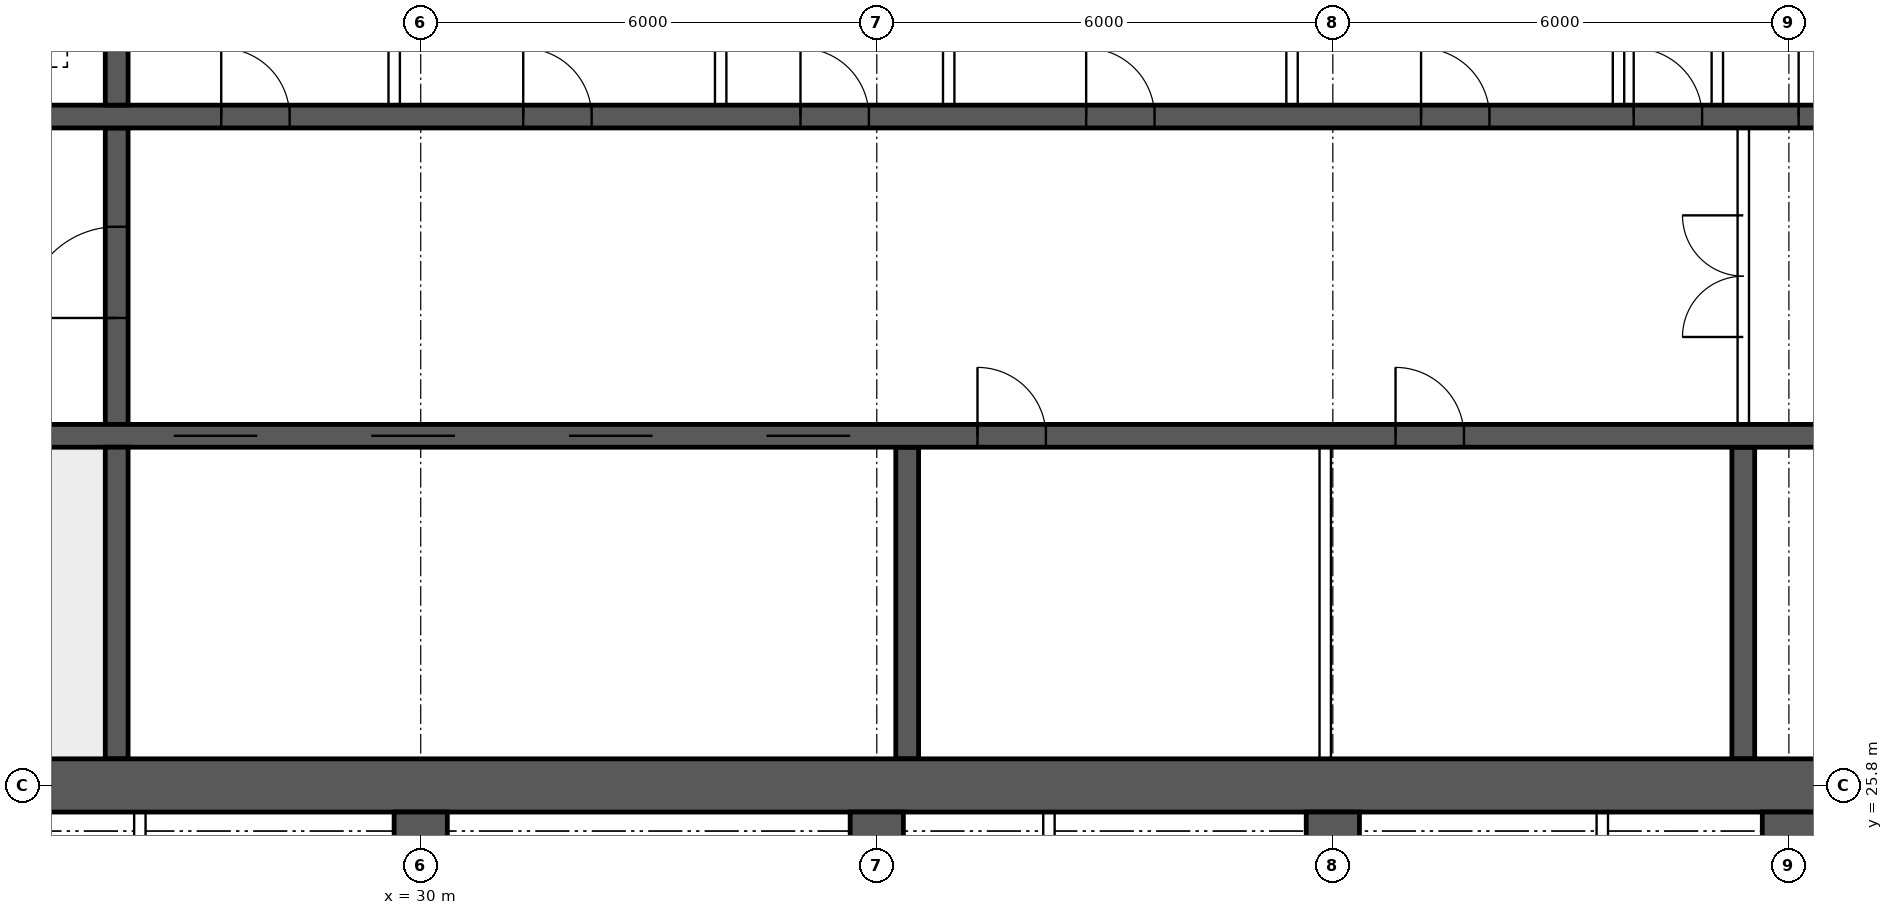
"""IFC4 building model, lengths in metres.
Left out: names, types, materials, properties, quantities, classifications, styles, units other than length and angle.
Written with IfcOpenShell. Run it as: python <this file> out.ifc"""

import sys

from ifc_helpers import new_model, si_unit, direction, frame, frame_2d, origin, place, context, subcontext, project, spatial, rectangle, extrude, element, fill, save


model = new_model("IFC4")
c1 = context("Model", 3, precision=1e-05, world=origin(), true_north=direction((0.0, 1.0)))
c2 = subcontext(c1, "Body", "Model", "MODEL_VIEW")
j1 = project(units=[si_unit("LENGTHUNIT", "METRE"), si_unit("PLANEANGLEUNIT", "RADIAN")], contexts=[c1])
p1 = place(None, origin())
s1 = spatial("IfcSite", under=j1, at=p1, CompositionType="ELEMENT")
p2 = place(p1, origin())
s2 = spatial("IfcBuilding", under=s1, at=p2, CompositionType="ELEMENT")
p3 = place(p2, frame((0.0, 0.0, 246.55)))
s3 = spatial("IfcBuildingStorey", under=s2, at=p3, CompositionType="ELEMENT", Elevation=246.55)
p4 = place(p3, frame((18.0, 25.8, 0.0), z_axis=(0.0, 0.0, 1.0), x_axis=(1.0, 0.0, 0.0)))
e1 = element("IfcWall", 1, at=p4, inside=s3, PredefinedType="SHEAR", context=c2, shape_type="SweptSolid", body=[
    extrude(rectangle(XDim=48.0, YDim=0.7, at=frame_2d((24.0, 0.0))), origin(), (0.0, 0.0, 1.0), 3.75),
])
p5 = place(p3, frame((18.35, 30.4, 0.0), z_axis=(0.0, 0.0, 1.0), x_axis=(1.0, 0.0, 0.0)))
e2 = element("IfcWall", 2, at=p5, inside=s3, PredefinedType="SHEAR", context=c2, shape_type="SweptSolid", body=[
    extrude(rectangle(XDim=47.3, YDim=0.3, at=frame_2d((23.65, 0.0))), origin(), (0.0, 0.0, 1.0), 3.75),
])
p6 = place(p5, frame((0.4, 0.0, 0.0)))
e3 = element("IfcOpeningElement", 3, at=p6, cuts=e2, PredefinedType="OPENING", context=c2, shape_type="SweptSolid", body=[
    extrude(rectangle(XDim=1.0, YDim=2.1, at=frame_2d((0.5, 1.05))), frame((0.0, 0.16, 0.0), z_axis=(0.0, -1.0, 0.0), x_axis=(1.0, 0.0, 0.0)), (0.0, 0.0, 1.0), 0.32),
])
p7 = place(p5, frame((45.9, 0.0, 0.0)))
e4 = element("IfcOpeningElement", 4, at=p7, cuts=e2, PredefinedType="OPENING", context=c2, shape_type="SweptSolid", body=[
    extrude(rectangle(XDim=1.0, YDim=2.1, at=frame_2d((0.5, 1.05))), frame((0.0, 0.16, 0.0), z_axis=(0.0, -1.0, 0.0), x_axis=(1.0, 0.0, 0.0)), (0.0, 0.0, 1.0), 0.32),
])
p8 = place(p5, frame((8.4, 0.0, 0.0)))
e5 = element("IfcOpeningElement", 5, at=p8, cuts=e2, PredefinedType="OPENING", context=c2, shape_type="SweptSolid", body=[
    extrude(rectangle(XDim=1.1, YDim=2.1, at=frame_2d((0.55, 1.05))), frame((0.0, 0.16, 0.0), z_axis=(0.0, -1.0, 0.0), x_axis=(1.0, 0.0, 0.0)), (0.0, 0.0, 1.0), 0.32),
])
p9 = place(p5, frame((11.0, 0.0, 0.0)))
e6 = element("IfcOpeningElement", 6, at=p9, cuts=e2, PredefinedType="OPENING", context=c2, shape_type="SweptSolid", body=[
    extrude(rectangle(XDim=1.1, YDim=2.1, at=frame_2d((0.55, 1.05))), frame((0.0, 0.16, 0.0), z_axis=(0.0, -1.0, 0.0), x_axis=(1.0, 0.0, 0.0)), (0.0, 0.0, 1.0), 0.32),
])
p10 = place(p5, frame((13.6, 0.0, 0.0)))
e7 = element("IfcOpeningElement", 7, at=p10, cuts=e2, PredefinedType="OPENING", context=c2, shape_type="SweptSolid", body=[
    extrude(rectangle(XDim=1.1, YDim=2.1, at=frame_2d((0.55, 1.05))), frame((0.0, 0.16, 0.0), z_axis=(0.0, -1.0, 0.0), x_axis=(1.0, 0.0, 0.0)), (0.0, 0.0, 1.0), 0.32),
])
p11 = place(p5, frame((16.2, 0.0, 0.0)))
e8 = element("IfcOpeningElement", 8, at=p11, cuts=e2, PredefinedType="OPENING", context=c2, shape_type="SweptSolid", body=[
    extrude(rectangle(XDim=1.1, YDim=2.1, at=frame_2d((0.55, 1.05))), frame((0.0, 0.16, 0.0), z_axis=(0.0, -1.0, 0.0), x_axis=(1.0, 0.0, 0.0)), (0.0, 0.0, 1.0), 0.32),
])
p12 = place(p5, frame((18.975, 0.0, 0.0)))
e9 = element("IfcOpeningElement", 9, at=p12, cuts=e2, PredefinedType="OPENING", context=c2, shape_type="SweptSolid", body=[
    extrude(rectangle(XDim=0.9, YDim=2.1, at=frame_2d((0.45, 1.05))), frame((0.0, 0.16, 0.0), z_axis=(0.0, -1.0, 0.0), x_axis=(1.0, 0.0, 0.0)), (0.0, 0.0, 1.0), 0.32),
])
p13 = place(p5, frame((24.475, 0.0, 0.0)))
e10 = element("IfcOpeningElement", 10, at=p13, cuts=e2, PredefinedType="OPENING", context=c2, shape_type="SweptSolid", body=[
    extrude(rectangle(XDim=0.9, YDim=2.1, at=frame_2d((0.45, 1.05))), frame((0.0, 0.16, 0.0), z_axis=(0.0, -1.0, 0.0), x_axis=(1.0, 0.0, 0.0)), (0.0, 0.0, 1.0), 0.32),
])
p14 = place(p5, frame((30.267, 0.0, 0.0)))
e11 = element("IfcOpeningElement", 11, at=p14, cuts=e2, PredefinedType="OPENING", context=c2, shape_type="SweptSolid", body=[
    extrude(rectangle(XDim=1.1, YDim=2.1, at=frame_2d((0.55, 1.05))), frame((0.0, 0.16, 0.0), z_axis=(0.0, -1.0, 0.0), x_axis=(1.0, 0.0, 0.0)), (0.0, 0.0, 1.0), 0.32),
])
p15 = place(p5, frame((33.8, 0.0, 0.0)))
e12 = element("IfcOpeningElement", 12, at=p15, cuts=e2, PredefinedType="OPENING", context=c2, shape_type="SweptSolid", body=[
    extrude(rectangle(XDim=1.1, YDim=2.1, at=frame_2d((0.55, 1.05))), frame((0.0, 0.16, 0.0), z_axis=(0.0, -1.0, 0.0), x_axis=(1.0, 0.0, 0.0)), (0.0, 0.0, 1.0), 0.32),
])
p16 = place(p5, frame((37.333, 0.0, 0.0)))
e13 = element("IfcOpeningElement", 13, at=p16, cuts=e2, PredefinedType="OPENING", context=c2, shape_type="SweptSolid", body=[
    extrude(rectangle(XDim=1.1, YDim=2.1, at=frame_2d((0.55, 1.05))), frame((0.0, 0.16, 0.0), z_axis=(0.0, -1.0, 0.0), x_axis=(1.0, 0.0, 0.0)), (0.0, 0.0, 1.0), 0.32),
])
p17 = place(p3, frame((18.35, 34.6, 0.0), z_axis=(0.0, 0.0, 1.0), x_axis=(1.0, 0.0, 0.0)))
e14 = element("IfcWall", 14, at=p17, inside=s3, PredefinedType="SHEAR", context=c2, shape_type="SweptSolid", body=[
    extrude(rectangle(XDim=47.3, YDim=0.3, at=frame_2d((23.65, 0.0))), origin(), (0.0, 0.0, 1.0), 3.75),
])
p18 = place(p17, frame((0.9, 0.0, 0.0)))
e15 = element("IfcOpeningElement", 15, at=p18, cuts=e14, PredefinedType="OPENING", context=c2, shape_type="SweptSolid", body=[
    extrude(rectangle(XDim=1.1, YDim=2.1, at=frame_2d((0.55, 1.05))), frame((0.0, 0.16, 0.0), z_axis=(0.0, -1.0, 0.0), x_axis=(1.0, 0.0, 0.0)), (0.0, 0.0, 1.0), 0.32),
])
p19 = place(p17, frame((45.3, 0.0, 0.0)))
e16 = element("IfcOpeningElement", 16, at=p19, cuts=e14, PredefinedType="OPENING", context=c2, shape_type="SweptSolid", body=[
    extrude(rectangle(XDim=1.1, YDim=2.1, at=frame_2d((0.55, 1.05))), frame((0.0, 0.16, 0.0), z_axis=(0.0, -1.0, 0.0), x_axis=(1.0, 0.0, 0.0)), (0.0, 0.0, 1.0), 0.32),
])
p20 = place(p17, frame((4.25, 0.0, 0.0)))
e17 = element("IfcOpeningElement", 17, at=p20, cuts=e14, PredefinedType="OPENING", context=c2, shape_type="SweptSolid", body=[
    extrude(rectangle(XDim=0.9, YDim=2.1, at=frame_2d((0.45, 1.05))), frame((0.0, 0.16, 0.0), z_axis=(0.0, -1.0, 0.0), x_axis=(1.0, 0.0, 0.0)), (0.0, 0.0, 1.0), 0.32),
])
p21 = place(p17, frame((42.15, 0.0, 0.0)))
e18 = element("IfcOpeningElement", 18, at=p21, cuts=e14, PredefinedType="OPENING", context=c2, shape_type="SweptSolid", body=[
    extrude(rectangle(XDim=0.9, YDim=2.1, at=frame_2d((0.45, 1.05))), frame((0.0, 0.16, 0.0), z_axis=(0.0, -1.0, 0.0), x_axis=(1.0, 0.0, 0.0)), (0.0, 0.0, 1.0), 0.32),
])
p22 = place(p17, frame((9.025, 0.0, 0.0)))
e19 = element("IfcOpeningElement", 19, at=p22, cuts=e14, PredefinedType="OPENING", context=c2, shape_type="SweptSolid", body=[
    extrude(rectangle(XDim=0.9, YDim=2.1, at=frame_2d((0.45, 1.05))), frame((0.0, 0.16, 0.0), z_axis=(0.0, -1.0, 0.0), x_axis=(1.0, 0.0, 0.0)), (0.0, 0.0, 1.0), 0.32),
])
p23 = place(p17, frame((12.999, 0.0, 0.0)))
e20 = element("IfcOpeningElement", 20, at=p23, cuts=e14, PredefinedType="OPENING", context=c2, shape_type="SweptSolid", body=[
    extrude(rectangle(XDim=0.9, YDim=2.1, at=frame_2d((0.45, 1.05))), frame((0.0, 0.16, 0.0), z_axis=(0.0, -1.0, 0.0), x_axis=(1.0, 0.0, 0.0)), (0.0, 0.0, 1.0), 0.32),
])
p24 = place(p17, frame((16.646, 0.0, 0.0)))
e21 = element("IfcOpeningElement", 21, at=p24, cuts=e14, PredefinedType="OPENING", context=c2, shape_type="SweptSolid", body=[
    extrude(rectangle(XDim=0.9, YDim=2.1, at=frame_2d((0.45, 1.05))), frame((0.0, 0.16, 0.0), z_axis=(0.0, -1.0, 0.0), x_axis=(1.0, 0.0, 0.0)), (0.0, 0.0, 1.0), 0.32),
])
p25 = place(p17, frame((20.405, 0.0, 0.0)))
e22 = element("IfcOpeningElement", 22, at=p25, cuts=e14, PredefinedType="OPENING", context=c2, shape_type="SweptSolid", body=[
    extrude(rectangle(XDim=0.9, YDim=2.1, at=frame_2d((0.45, 1.05))), frame((0.0, 0.16, 0.0), z_axis=(0.0, -1.0, 0.0), x_axis=(1.0, 0.0, 0.0)), (0.0, 0.0, 1.0), 0.32),
])
p26 = place(p17, frame((24.811, 0.0, 0.0)))
e23 = element("IfcOpeningElement", 23, at=p26, cuts=e14, PredefinedType="OPENING", context=c2, shape_type="SweptSolid", body=[
    extrude(rectangle(XDim=0.9, YDim=2.1, at=frame_2d((0.45, 1.05))), frame((0.0, 0.16, 0.0), z_axis=(0.0, -1.0, 0.0), x_axis=(1.0, 0.0, 0.0)), (0.0, 0.0, 1.0), 0.32),
])
p27 = place(p17, frame((27.608, 0.0, 0.0)))
e24 = element("IfcOpeningElement", 24, at=p27, cuts=e14, PredefinedType="OPENING", context=c2, shape_type="SweptSolid", body=[
    extrude(rectangle(XDim=0.9, YDim=2.1, at=frame_2d((0.45, 1.05))), frame((0.0, 0.16, 0.0), z_axis=(0.0, -1.0, 0.0), x_axis=(1.0, 0.0, 0.0)), (0.0, 0.0, 1.0), 0.32),
])
p28 = place(p17, frame((29.778, 0.0, 0.0)))
e25 = element("IfcOpeningElement", 25, at=p28, cuts=e14, PredefinedType="OPENING", context=c2, shape_type="SweptSolid", body=[
    extrude(rectangle(XDim=0.9, YDim=2.1, at=frame_2d((0.45, 1.05))), frame((0.0, 0.16, 0.0), z_axis=(0.0, -1.0, 0.0), x_axis=(1.0, 0.0, 0.0)), (0.0, 0.0, 1.0), 0.32),
])
p29 = place(p17, frame((33.577, 0.0, 0.0)))
e26 = element("IfcOpeningElement", 26, at=p29, cuts=e14, PredefinedType="OPENING", context=c2, shape_type="SweptSolid", body=[
    extrude(rectangle(XDim=0.9, YDim=2.1, at=frame_2d((0.45, 1.05))), frame((0.0, 0.16, 0.0), z_axis=(0.0, -1.0, 0.0), x_axis=(1.0, 0.0, 0.0)), (0.0, 0.0, 1.0), 0.32),
])
p30 = place(p17, frame((37.528, 0.0, 0.0)))
e27 = element("IfcOpeningElement", 27, at=p30, cuts=e14, PredefinedType="OPENING", context=c2, shape_type="SweptSolid", body=[
    extrude(rectangle(XDim=0.9, YDim=2.1, at=frame_2d((0.45, 1.05))), frame((0.0, 0.16, 0.0), z_axis=(0.0, -1.0, 0.0), x_axis=(1.0, 0.0, 0.0)), (0.0, 0.0, 1.0), 0.32),
])
p31 = place(p3, frame((26.0, 26.15, 0.0), z_axis=(0.0, 0.0, 1.0), x_axis=(0.0, 1.0, 0.0)))
e28 = element("IfcWall", 28, at=p31, inside=s3, PredefinedType="SHEAR", context=c2, shape_type="SweptSolid", body=[
    extrude(rectangle(XDim=4.1, YDim=0.3, at=frame_2d((2.05, 0.0))), origin(), (0.0, 0.0, 1.0), 3.75),
])
p32 = place(p3, frame((26.0, 30.55, 0.0), z_axis=(0.0, 0.0, 1.0), x_axis=(0.0, 1.0, 0.0)))
e29 = element("IfcWall", 29, at=p32, inside=s3, PredefinedType="SHEAR", context=c2, shape_type="SweptSolid", body=[
    extrude(rectangle(XDim=3.9, YDim=0.3, at=frame_2d((1.95, 0.0))), origin(), (0.0, 0.0, 1.0), 3.75),
])
p33 = place(p32, frame((1.4, 0.0, 0.0)))
e30 = element("IfcOpeningElement", 30, at=p33, cuts=e29, PredefinedType="OPENING", context=c2, shape_type="SweptSolid", body=[
    extrude(rectangle(XDim=1.2, YDim=2.1, at=frame_2d((0.6, 1.05))), frame((0.0, 0.16, 0.0), z_axis=(0.0, -1.0, 0.0), x_axis=(1.0, 0.0, 0.0)), (0.0, 0.0, 1.0), 0.32),
])
p34 = place(p3, frame((26.0, 34.75, 0.0), z_axis=(0.0, 0.0, 1.0), x_axis=(0.0, 1.0, 0.0)))
e31 = element("IfcWall", 31, at=p34, inside=s3, PredefinedType="SHEAR", context=c2, shape_type="SweptSolid", body=[
    extrude(rectangle(XDim=3.1, YDim=0.3, at=frame_2d((1.55, 0.0))), origin(), (0.0, 0.0, 1.0), 3.75),
])
for number, where, z_axis, x_axis in (
    (32, (36.4, 26.15, 0.0), (0.0, 0.0, 1.0), (0.0, 1.0, 0.0)),
    (33, (47.4, 26.15, 0.0), (0.0, 0.0, 1.0), (0.0, 1.0, 0.0)),
):
    element("IfcWall", number, at=place(p3, frame(where, z_axis=z_axis, x_axis=x_axis)), inside=s3, PredefinedType="SHEAR", context=c2, shape_type="SweptSolid", body=[
        extrude(rectangle(XDim=4.1, YDim=0.3, at=frame_2d((2.05, 0.0))), origin(), (0.0, 0.0, 1.0), 3.75),
    ])
for number, where, z_axis, x_axis in (
    (34, (30.0, 18.4, 0.0), (0.0, 0.0, 1.0), (0.0, 1.0, 0.0)),
    (35, (36.0, 18.4, 0.0), (0.0, 0.0, 1.0), (0.0, 1.0, 0.0)),
    (36, (42.0, 18.4, 0.0), (0.0, 0.0, 1.0), (0.0, 1.0, 0.0)),
    (37, (48.0, 18.4, 0.0), (0.0, 0.0, 1.0), (0.0, 1.0, 0.0)),
):
    element("IfcWall", number, at=place(p3, frame(where, z_axis=z_axis, x_axis=x_axis)), inside=s3, PredefinedType="SHEAR", context=c2, shape_type="SweptSolid", body=[
        extrude(rectangle(XDim=7.05, YDim=0.7, at=frame_2d((3.525, 0.0))), origin(), (0.0, 0.0, 1.0), 3.75),
    ])
p35 = place(p3, frame((47.4, 30.55, 0.0), z_axis=(0.0, 0.0, 1.0), x_axis=(0.0, 1.0, 0.0)))
e38 = element("IfcWall", 38, at=p35, inside=s3, PredefinedType="SOLIDWALL", context=c2, shape_type="SweptSolid", body=[
    extrude(rectangle(XDim=3.9, YDim=0.15, at=frame_2d((1.95, 0.0))), origin(), (0.0, 0.0, 1.0), 3.5),
])
p36 = place(p35, frame((1.15, 0.0, 0.0)))
e39 = element("IfcOpeningElement", 39, at=p36, cuts=e38, PredefinedType="OPENING", context=c2, shape_type="SweptSolid", body=[
    extrude(rectangle(XDim=1.6, YDim=2.1, at=frame_2d((0.8, 1.05))), frame((0.0, 0.085, 0.0), z_axis=(0.0, -1.0, 0.0), x_axis=(1.0, 0.0, 0.0)), (0.0, 0.0, 1.0), 0.17),
])
for number, where, z_axis, x_axis in (
    (40, (29.651, 34.75, 0.0), (0.0, 0.0, 1.0), (0.0, 1.0, 0.0)),
    (41, (33.946, 34.75, 0.0), (0.0, 0.0, 1.0), (0.0, 1.0, 0.0)),
    (42, (36.946, 34.75, 0.0), (0.0, 0.0, 1.0), (0.0, 1.0, 0.0)),
    (43, (41.463, 34.75, 0.0), (0.0, 0.0, 1.0), (0.0, 1.0, 0.0)),
    (44, (45.758, 34.75, 0.0), (0.0, 0.0, 1.0), (0.0, 1.0, 0.0)),
    (45, (47.058, 34.75, 0.0), (0.0, 0.0, 1.0), (0.0, 1.0, 0.0)),
):
    element("IfcWall", number, at=place(p3, frame(where, z_axis=z_axis, x_axis=x_axis)), inside=s3, PredefinedType="SOLIDWALL", context=c2, shape_type="SweptSolid", body=[
        extrude(rectangle(XDim=3.1, YDim=0.15, at=frame_2d((1.55, 0.0))), origin(), (0.0, 0.0, 1.0), 3.5),
    ])
p37 = place(p3, frame((41.9, 26.15, 0.0), z_axis=(0.0, 0.0, 1.0), x_axis=(0.0, 1.0, 0.0)))
e46 = element("IfcWall", 46, at=p37, inside=s3, PredefinedType="SOLIDWALL", context=c2, shape_type="SweptSolid", body=[
    extrude(rectangle(XDim=4.1, YDim=0.15, at=frame_2d((2.05, 0.0))), origin(), (0.0, 0.0, 1.0), 3.5),
])
for number, where, z_axis, x_axis in (
    (47, (26.305, 18.5, 0.0), (0.0, 0.0, 1.0), (0.0, 1.0, 0.0)),
    (48, (38.265, 18.5, 0.0), (0.0, 0.0, 1.0), (0.0, 1.0, 0.0)),
    (49, (45.545, 18.5, 0.0), (0.0, 0.0, 1.0), (0.0, 1.0, 0.0)),
):
    element("IfcWall", number, at=place(p3, frame(where, z_axis=z_axis, x_axis=x_axis)), inside=s3, PredefinedType="PARTITIONING", context=c2, shape_type="SweptSolid", body=[
        extrude(rectangle(XDim=6.95, YDim=0.15, at=frame_2d((3.475, 0.0))), origin(), (0.0, 0.0, 1.0), 3.5),
    ])
p38 = place(p36, origin())
e50 = element("IfcDoor", 50, at=p38, inside=s3, OperationType="DOUBLE_DOOR_SINGLE_SWING", PredefinedType="DOOR", context=c2, shape_type="SweptSolid", body=[
    extrude(rectangle(XDim=1.6, YDim=2.1, at=frame_2d((0.8, 1.05))), frame((0.0, 0.025, 0.0), z_axis=(0.0, -1.0, 0.0), x_axis=(1.0, 0.0, 0.0)), (0.0, 0.0, 1.0), 0.05),
])
fill(e39, e50)
p39 = place(p33, origin())
e51 = element("IfcDoor", 51, at=p39, inside=s3, OperationType="SINGLE_SWING_LEFT", PredefinedType="DOOR", context=c2, shape_type="SweptSolid", body=[
    extrude(rectangle(XDim=1.2, YDim=2.1, at=frame_2d((0.6, 1.05))), frame((0.0, 0.025, 0.0), z_axis=(0.0, -1.0, 0.0), x_axis=(1.0, 0.0, 0.0)), (0.0, 0.0, 1.0), 0.05),
])
fill(e30, e51)
p40 = place(p22, origin())
e52 = element("IfcDoor", 52, at=p40, inside=s3, OperationType="SINGLE_SWING_LEFT", PredefinedType="DOOR", context=c2, shape_type="SweptSolid", body=[
    extrude(rectangle(XDim=0.9, YDim=2.1, at=frame_2d((0.45, 1.05))), frame((0.0, 0.025, 0.0), z_axis=(0.0, -1.0, 0.0), x_axis=(1.0, 0.0, 0.0)), (0.0, 0.0, 1.0), 0.05),
])
fill(e19, e52)
p41 = place(p23, origin())
e53 = element("IfcDoor", 53, at=p41, inside=s3, OperationType="SINGLE_SWING_LEFT", PredefinedType="DOOR", context=c2, shape_type="SweptSolid", body=[
    extrude(rectangle(XDim=0.9, YDim=2.1, at=frame_2d((0.45, 1.05))), frame((0.0, 0.025, 0.0), z_axis=(0.0, -1.0, 0.0), x_axis=(1.0, 0.0, 0.0)), (0.0, 0.0, 1.0), 0.05),
])
fill(e20, e53)
p42 = place(p24, origin())
e54 = element("IfcDoor", 54, at=p42, inside=s3, OperationType="SINGLE_SWING_LEFT", PredefinedType="DOOR", context=c2, shape_type="SweptSolid", body=[
    extrude(rectangle(XDim=0.9, YDim=2.1, at=frame_2d((0.45, 1.05))), frame((0.0, 0.025, 0.0), z_axis=(0.0, -1.0, 0.0), x_axis=(1.0, 0.0, 0.0)), (0.0, 0.0, 1.0), 0.05),
])
fill(e21, e54)
p43 = place(p25, origin())
e55 = element("IfcDoor", 55, at=p43, inside=s3, OperationType="SINGLE_SWING_LEFT", PredefinedType="DOOR", context=c2, shape_type="SweptSolid", body=[
    extrude(rectangle(XDim=0.9, YDim=2.1, at=frame_2d((0.45, 1.05))), frame((0.0, 0.025, 0.0), z_axis=(0.0, -1.0, 0.0), x_axis=(1.0, 0.0, 0.0)), (0.0, 0.0, 1.0), 0.05),
])
fill(e22, e55)
p44 = place(p26, origin())
e56 = element("IfcDoor", 56, at=p44, inside=s3, OperationType="SINGLE_SWING_LEFT", PredefinedType="DOOR", context=c2, shape_type="SweptSolid", body=[
    extrude(rectangle(XDim=0.9, YDim=2.1, at=frame_2d((0.45, 1.05))), frame((0.0, 0.025, 0.0), z_axis=(0.0, -1.0, 0.0), x_axis=(1.0, 0.0, 0.0)), (0.0, 0.0, 1.0), 0.05),
])
fill(e23, e56)
p45 = place(p27, origin())
e57 = element("IfcDoor", 57, at=p45, inside=s3, OperationType="SINGLE_SWING_LEFT", PredefinedType="DOOR", context=c2, shape_type="SweptSolid", body=[
    extrude(rectangle(XDim=0.9, YDim=2.1, at=frame_2d((0.45, 1.05))), frame((0.0, 0.025, 0.0), z_axis=(0.0, -1.0, 0.0), x_axis=(1.0, 0.0, 0.0)), (0.0, 0.0, 1.0), 0.05),
])
fill(e24, e57)
p46 = place(p28, origin())
e58 = element("IfcDoor", 58, at=p46, inside=s3, OperationType="SINGLE_SWING_LEFT", PredefinedType="DOOR", context=c2, shape_type="SweptSolid", body=[
    extrude(rectangle(XDim=0.9, YDim=2.1, at=frame_2d((0.45, 1.05))), frame((0.0, 0.025, 0.0), z_axis=(0.0, -1.0, 0.0), x_axis=(1.0, 0.0, 0.0)), (0.0, 0.0, 1.0), 0.05),
])
fill(e25, e58)
p47 = place(p8, origin())
e59 = element("IfcDoor", 59, at=p47, inside=s3, OperationType="DOUBLE_DOOR_SLIDING", PredefinedType="DOOR", context=c2, shape_type="SweptSolid", body=[
    extrude(rectangle(XDim=1.1, YDim=2.1, at=frame_2d((0.55, 1.05))), frame((0.0, 0.025, 0.0), z_axis=(0.0, -1.0, 0.0), x_axis=(1.0, 0.0, 0.0)), (0.0, 0.0, 1.0), 0.05),
])
fill(e5, e59)
p48 = place(p9, origin())
e60 = element("IfcDoor", 60, at=p48, inside=s3, OperationType="DOUBLE_DOOR_SLIDING", PredefinedType="DOOR", context=c2, shape_type="SweptSolid", body=[
    extrude(rectangle(XDim=1.1, YDim=2.1, at=frame_2d((0.55, 1.05))), frame((0.0, 0.025, 0.0), z_axis=(0.0, -1.0, 0.0), x_axis=(1.0, 0.0, 0.0)), (0.0, 0.0, 1.0), 0.05),
])
fill(e6, e60)
p49 = place(p10, origin())
e61 = element("IfcDoor", 61, at=p49, inside=s3, OperationType="DOUBLE_DOOR_SLIDING", PredefinedType="DOOR", context=c2, shape_type="SweptSolid", body=[
    extrude(rectangle(XDim=1.1, YDim=2.1, at=frame_2d((0.55, 1.05))), frame((0.0, 0.025, 0.0), z_axis=(0.0, -1.0, 0.0), x_axis=(1.0, 0.0, 0.0)), (0.0, 0.0, 1.0), 0.05),
])
fill(e7, e61)
p50 = place(p11, origin())
e62 = element("IfcDoor", 62, at=p50, inside=s3, OperationType="DOUBLE_DOOR_SLIDING", PredefinedType="DOOR", context=c2, shape_type="SweptSolid", body=[
    extrude(rectangle(XDim=1.1, YDim=2.1, at=frame_2d((0.55, 1.05))), frame((0.0, 0.025, 0.0), z_axis=(0.0, -1.0, 0.0), x_axis=(1.0, 0.0, 0.0)), (0.0, 0.0, 1.0), 0.05),
])
fill(e8, e62)
p51 = place(p12, origin())
e63 = element("IfcDoor", 63, at=p51, inside=s3, OperationType="SINGLE_SWING_LEFT", PredefinedType="DOOR", context=c2, shape_type="SweptSolid", body=[
    extrude(rectangle(XDim=0.9, YDim=2.1, at=frame_2d((0.45, 1.05))), frame((0.0, 0.025, 0.0), z_axis=(0.0, -1.0, 0.0), x_axis=(1.0, 0.0, 0.0)), (0.0, 0.0, 1.0), 0.05),
])
fill(e9, e63)
p52 = place(p13, origin())
e64 = element("IfcDoor", 64, at=p52, inside=s3, OperationType="SINGLE_SWING_LEFT", PredefinedType="DOOR", context=c2, shape_type="SweptSolid", body=[
    extrude(rectangle(XDim=0.9, YDim=2.1, at=frame_2d((0.45, 1.05))), frame((0.0, 0.025, 0.0), z_axis=(0.0, -1.0, 0.0), x_axis=(1.0, 0.0, 0.0)), (0.0, 0.0, 1.0), 0.05),
])
fill(e10, e64)
save(model, sys.argv[1])
